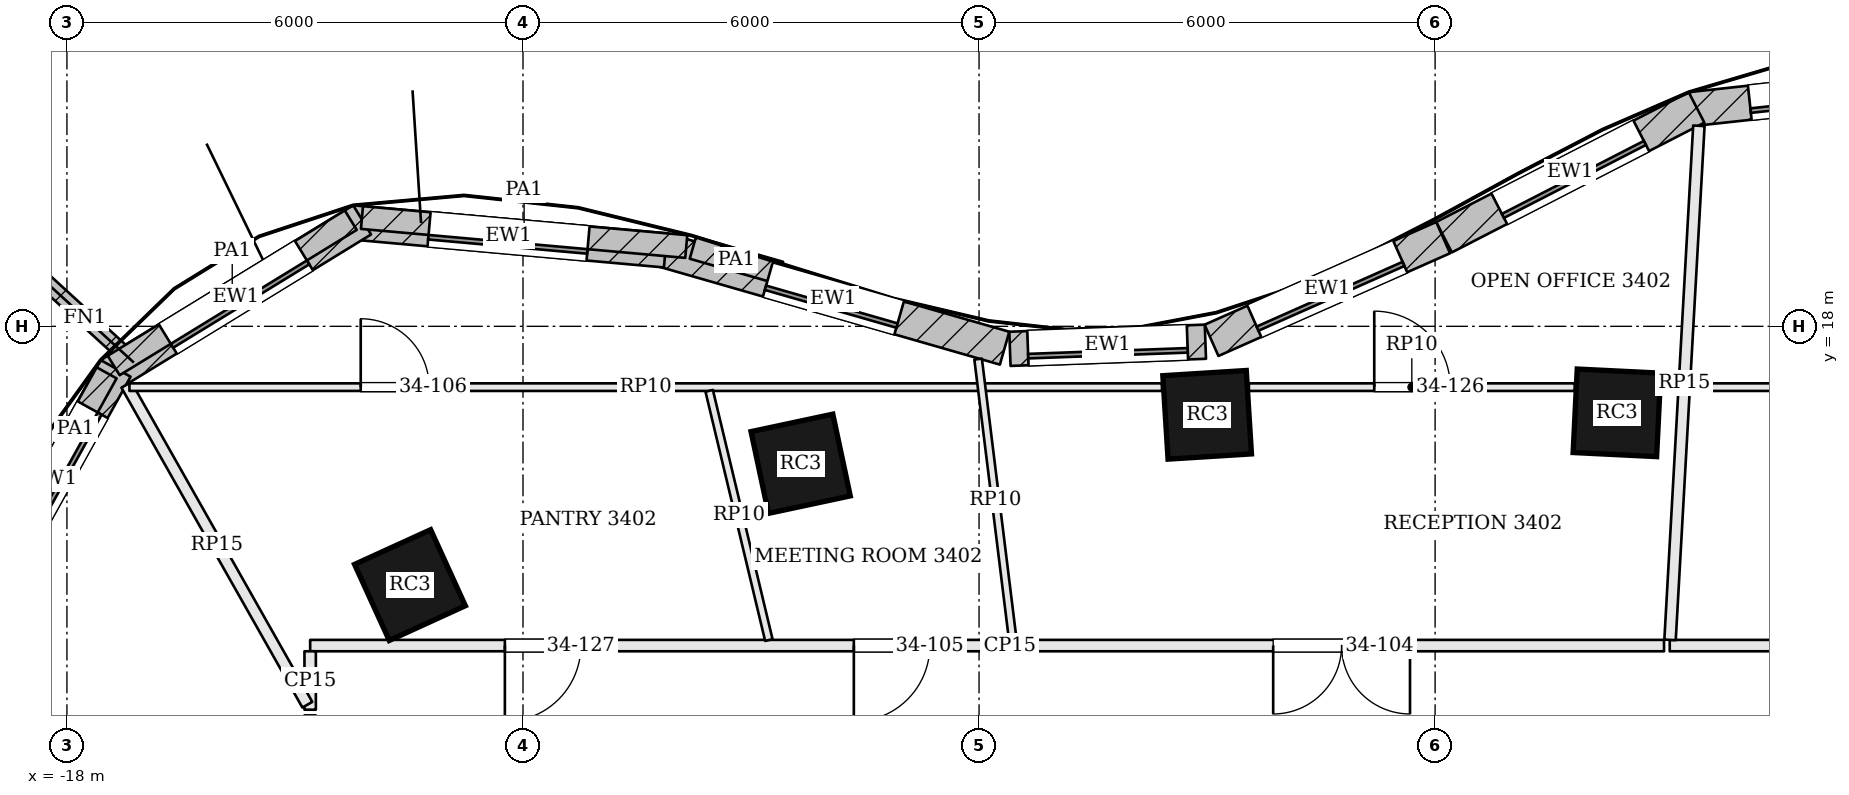
"""IFC4 building model, lengths in metres.
Left out: names, types, materials, properties, quantities, classifications, styles, units other than length and angle.
Written with IfcOpenShell. Run it as: python <this file> out.ifc"""

import sys

from ifc_helpers import new_model, si_unit, direction, frame, frame_2d, origin, origin_2d, place, context, subcontext, project, spatial, rectangle, extrude, element, fill, save


model = new_model("IFC4")
c1 = context("Model", 3, precision=1e-05, world=origin(), true_north=direction((0.0, 1.0)))
c2 = subcontext(c1, "Body", "Model", "MODEL_VIEW")
j1 = project(units=[si_unit("LENGTHUNIT", "METRE"), si_unit("PLANEANGLEUNIT", "RADIAN")], contexts=[c1])
p1 = place(None, origin())
s1 = spatial("IfcSite", under=j1, at=p1, CompositionType="ELEMENT")
p2 = place(p1, origin())
s2 = spatial("IfcBuilding", under=s1, at=p2, CompositionType="ELEMENT")
p3 = place(p2, frame((0.0, 0.0, 142.2)))
s3 = spatial("IfcBuildingStorey", under=s2, at=p3, CompositionType="ELEMENT", Elevation=142.2)
for number, where, z_axis, x_axis in (
    (1, (2.392, 16.862, 0.0), (0.0, 0.0, 1.0), (-0.999, 0.049, 0.0)),
    (2, (-2.999, 16.836, 0.0), (0.0, 0.0, 1.0), (-0.998, -0.062, 0.0)),
    (3, (-8.347, 16.192, 0.0), (0.0, 0.0, 1.0), (-0.978, -0.209, 0.0)),
    (4, (-13.487, 14.596, 0.0), (0.0, 0.0, 1.0), (-0.91, -0.415, 0.0)),
):
    element("IfcColumn", number, at=place(p3, frame(where, z_axis=z_axis, x_axis=x_axis)), inside=s3, PredefinedType="COLUMN", context=c2, shape_type="SweptSolid", body=[
        extrude(rectangle(XDim=1.1, YDim=1.1, at=origin_2d()), origin(), (0.0, 0.0, 1.0), 3.9),
    ])
p4 = place(p3, frame((7.003, 21.255, 0.0), z_axis=(0.0, 0.0, 1.0), x_axis=(-0.99407653264, -0.108682322638, 0.0)))
e5 = element("IfcWall", 5, at=p4, inside=s3, PredefinedType="SOLIDWALL", context=c2, shape_type="SweptSolid", body=[
    extrude(rectangle(XDim=3.662, YDim=0.45, at=frame_2d((1.831, 0.0))), origin(), (0.0, 0.0, 1.0), 3.7),
])
p5 = place(p4, frame((0.781, 0.0, 0.9)))
e6 = element("IfcOpeningElement", 6, at=p5, cuts=e5, PredefinedType="OPENING", context=c2, shape_type="SweptSolid", body=[
    extrude(rectangle(XDim=2.1, YDim=2.3, at=frame_2d((1.05, 1.15))), frame((0.0, 0.235, 0.0), z_axis=(0.0, -1.0, 0.0), x_axis=(1.0, 0.0, 0.0)), (0.0, 0.0, 1.0), 0.47),
])
p6 = place(p3, frame((3.44, 20.88, 0.0), z_axis=(0.0, 0.0, 1.0), x_axis=(-0.889471529144, -0.456990589446, 0.0)))
e7 = element("IfcWall", 7, at=p6, inside=s3, PredefinedType="SOLIDWALL", context=c2, shape_type="SweptSolid", body=[
    extrude(rectangle(XDim=3.735, YDim=0.45, at=frame_2d((1.868, 0.0))), origin(), (0.0, 0.0, 1.0), 3.7),
])
p7 = place(p6, frame((0.818, 0.0, 0.9)))
e8 = element("IfcOpeningElement", 8, at=p7, cuts=e7, PredefinedType="OPENING", context=c2, shape_type="SweptSolid", body=[
    extrude(rectangle(XDim=2.1, YDim=2.3, at=frame_2d((1.05, 1.15))), frame((0.0, 0.235, 0.0), z_axis=(0.0, -1.0, 0.0), x_axis=(1.0, 0.0, 0.0)), (0.0, 0.0, 1.0), 0.47),
])
p8 = place(p3, frame((0.105, 19.167, 0.0), z_axis=(0.0, 0.0, 1.0), x_axis=(-0.91414046241, -0.405397601109, 0.0)))
e9 = element("IfcWall", 9, at=p8, inside=s3, PredefinedType="SOLIDWALL", context=c2, shape_type="SweptSolid", body=[
    extrude(rectangle(XDim=3.333, YDim=0.45, at=frame_2d((1.667, 0.0))), origin(), (0.0, 0.0, 1.0), 3.7),
])
p9 = place(p8, frame((0.617, 0.0, 0.9)))
e10 = element("IfcOpeningElement", 10, at=p9, cuts=e9, PredefinedType="OPENING", context=c2, shape_type="SweptSolid", body=[
    extrude(rectangle(XDim=2.1, YDim=2.3, at=frame_2d((1.05, 1.15))), frame((0.0, 0.235, 0.0), z_axis=(0.0, -1.0, 0.0), x_axis=(1.0, 0.0, 0.0)), (0.0, 0.0, 1.0), 0.47),
])
p10 = place(p3, frame((-3.022, 17.798, 0.0), z_axis=(0.0, 0.0, 1.0), x_axis=(-0.999339560591, -0.036337895349, 0.0)))
e11 = element("IfcWall", 11, at=p10, inside=s3, PredefinedType="SOLIDWALL", context=c2, shape_type="SweptSolid", body=[
    extrude(rectangle(XDim=2.573, YDim=0.45, at=frame_2d((1.287, 0.0))), origin(), (0.0, 0.0, 1.0), 3.7),
])
p11 = place(p10, frame((0.237, 0.0, 0.9)))
e12 = element("IfcOpeningElement", 12, at=p11, cuts=e11, PredefinedType="OPENING", context=c2, shape_type="SweptSolid", body=[
    extrude(rectangle(XDim=2.1, YDim=2.3, at=frame_2d((1.05, 1.15))), frame((0.0, 0.235, 0.0), z_axis=(0.0, -1.0, 0.0), x_axis=(1.0, 0.0, 0.0)), (0.0, 0.0, 1.0), 0.47),
])
p12 = place(p3, frame((-5.664, 17.713, 0.0), z_axis=(0.0, 0.0, 1.0), x_axis=(-0.961108031684, 0.276172684083, 0.0)))
e13 = element("IfcWall", 13, at=p12, inside=s3, PredefinedType="SOLIDWALL", context=c2, shape_type="SweptSolid", body=[
    extrude(rectangle(XDim=4.686, YDim=0.45, at=frame_2d((2.343, 0.0))), origin(), (0.0, 0.0, 1.0), 3.7),
])
p13 = place(p12, frame((1.443, 0.0, 0.9)))
e14 = element("IfcOpeningElement", 14, at=p13, cuts=e13, PredefinedType="OPENING", context=c2, shape_type="SweptSolid", body=[
    extrude(rectangle(XDim=1.8, YDim=2.3, at=frame_2d((0.9, 1.15))), frame((0.0, 0.235, 0.0), z_axis=(0.0, -1.0, 0.0), x_axis=(1.0, 0.0, 0.0)), (0.0, 0.0, 1.0), 0.47),
])
p14 = place(p3, frame((-10.126, 18.999, 0.0), z_axis=(0.0, 0.0, 1.0), x_axis=(-0.996031087117, 0.089006030672, 0.0)))
e15 = element("IfcWall", 15, at=p14, inside=s3, PredefinedType="SOLIDWALL", context=c2, shape_type="SweptSolid", body=[
    extrude(rectangle(XDim=4.145, YDim=0.45, at=frame_2d((2.072, 0.0))), origin(), (0.0, 0.0, 1.0), 3.7),
])
p15 = place(p14, frame((1.022, 0.0, 0.9)))
e16 = element("IfcOpeningElement", 16, at=p15, cuts=e15, PredefinedType="OPENING", context=c2, shape_type="SweptSolid", body=[
    extrude(rectangle(XDim=2.1, YDim=2.3, at=frame_2d((1.05, 1.15))), frame((0.0, 0.235, 0.0), z_axis=(0.0, -1.0, 0.0), x_axis=(1.0, 0.0, 0.0)), (0.0, 0.0, 1.0), 0.47),
])
p16 = place(p3, frame((-14.116, 19.4, 0.0), z_axis=(0.0, 0.0, 1.0), x_axis=(-0.852622865325, -0.522526793117, 0.0)))
e17 = element("IfcWall", 17, at=p16, inside=s3, PredefinedType="SOLIDWALL", context=c2, shape_type="SweptSolid", body=[
    extrude(rectangle(XDim=3.896, YDim=0.45, at=frame_2d((1.948, 0.0))), origin(), (0.0, 0.0, 1.0), 3.7),
])
p17 = place(p16, frame((0.898, 0.0, 0.9)))
e18 = element("IfcOpeningElement", 18, at=p17, cuts=e17, PredefinedType="OPENING", context=c2, shape_type="SweptSolid", body=[
    extrude(rectangle(XDim=2.1, YDim=2.3, at=frame_2d((1.05, 1.15))), frame((0.0, 0.235, 0.0), z_axis=(0.0, -1.0, 0.0), x_axis=(1.0, 0.0, 0.0)), (0.0, 0.0, 1.0), 0.47),
])
p18 = place(p3, frame((-17.359, 17.447, 0.0), z_axis=(0.0, 0.0, 1.0), x_axis=(-0.485618126214, -0.874171056197, 0.0)))
e19 = element("IfcWall", 19, at=p18, inside=s3, PredefinedType="SOLIDWALL", context=c2, shape_type="SweptSolid", body=[
    extrude(rectangle(XDim=3.343, YDim=0.45, at=frame_2d((1.671, 0.0))), origin(), (0.0, 0.0, 1.0), 3.7),
])
p19 = place(p18, frame((0.621, 0.0, 0.9)))
e20 = element("IfcOpeningElement", 20, at=p19, cuts=e19, PredefinedType="OPENING", context=c2, shape_type="SweptSolid", body=[
    extrude(rectangle(XDim=2.1, YDim=2.3, at=frame_2d((1.05, 1.15))), frame((0.0, 0.235, 0.0), z_axis=(0.0, -1.0, 0.0), x_axis=(1.0, 0.0, 0.0)), (0.0, 0.0, 1.0), 0.47),
])
p20 = place(p3, frame((-17.119, 17.523, 0.0), z_axis=(0.0, 0.0, 1.0), x_axis=(-0.737866019047, 0.674947211221, 0.0)))
e21 = element("IfcWall", 21, at=p20, inside=s3, PredefinedType="SOLIDWALL", context=c2, shape_type="SweptSolid", body=[
    extrude(rectangle(XDim=1.75, YDim=0.2, at=frame_2d((0.875, 0.0))), origin(), (0.0, 0.0, 1.0), 3.7),
])
p21 = place(p3, frame((-8.619, 18.704, 3.9), z_axis=(0.0, 0.0, 1.0), x_axis=(-0.961097843869, 0.276208136212, 0.0)))
e22 = element("IfcWall", 22, at=p21, inside=s3, PredefinedType="PARAPET", context=c2, shape_type="SweptSolid", body=[
    extrude(rectangle(XDim=1.192, YDim=0.3, at=frame_2d((0.596, 0.0))), origin(), (0.0, 0.0, 1.0), 1.1),
])
p22 = place(p3, frame((-9.852, 19.05, 3.9), z_axis=(0.0, 0.0, 1.0), x_axis=(-0.996029858658, 0.089019776805, 0.0)))
e23 = element("IfcWall", 23, at=p22, inside=s3, PredefinedType="PARAPET", context=c2, shape_type="SweptSolid", body=[
    extrude(rectangle(XDim=4.284, YDim=0.3, at=frame_2d((2.142, 0.0))), origin(), (0.0, 0.0, 1.0), 1.1),
])
p23 = place(p3, frame((-14.266, 19.396, 3.9), z_axis=(0.0, 0.0, 1.0), x_axis=(-0.852626191256, -0.522521366055, 0.0)))
e24 = element("IfcWall", 24, at=p23, inside=s3, PredefinedType="PARAPET", context=c2, shape_type="SweptSolid", body=[
    extrude(rectangle(XDim=3.658, YDim=0.3, at=frame_2d((1.829, 0.0))), origin(), (0.0, 0.0, 1.0), 1.1),
])
p24 = place(p3, frame((-17.478, 17.388, 3.9), z_axis=(0.0, 0.0, 1.0), x_axis=(-0.485655243725, -0.874150435705, 0.0)))
e25 = element("IfcWall", 25, at=p24, inside=s3, PredefinedType="PARAPET", context=c2, shape_type="SweptSolid", body=[
    extrude(rectangle(XDim=1.684, YDim=0.3, at=frame_2d((0.842, 0.0))), origin(), (0.0, 0.0, 1.0), 1.1),
])
p25 = place(p3, frame((14.725, 13.8, 0.0), z_axis=(0.0, 0.0, 1.0), x_axis=(-1.0, 0.0, 0.0)))
e26 = element("IfcWall", 26, at=p25, inside=s3, PredefinedType="PARTITIONING", context=c2, shape_type="SweptSolid", body=[
    extrude(rectangle(XDim=11.638, YDim=0.15, at=frame_2d((5.819, 0.0))), origin(), (0.0, 0.0, 1.0), 3.198),
])
p26 = place(p25, frame((2.95, 0.0, 0.0)))
e27 = element("IfcOpeningElement", 27, at=p26, cuts=e26, PredefinedType="OPENING", context=c2, shape_type="SweptSolid", body=[
    extrude(rectangle(XDim=1.0, YDim=2.1, at=frame_2d((0.5, 1.05))), frame((0.0, 0.085, 0.0), z_axis=(0.0, -1.0, 0.0), x_axis=(1.0, 0.0, 0.0)), (0.0, 0.0, 1.0), 0.17),
])
p27 = place(p25, frame((8.35, 0.0, 0.0)))
e28 = element("IfcOpeningElement", 28, at=p27, cuts=e26, PredefinedType="OPENING", context=c2, shape_type="SweptSolid", body=[
    extrude(rectangle(XDim=1.0, YDim=2.1, at=frame_2d((0.5, 1.05))), frame((0.0, 0.085, 0.0), z_axis=(0.0, -1.0, 0.0), x_axis=(1.0, 0.0, 0.0)), (0.0, 0.0, 1.0), 0.17),
])
p28 = place(p3, frame((3.47, 20.638, 0.0), z_axis=(0.0, 0.0, 1.0), x_axis=(-0.056008975247, -0.998430265312, 0.0)))
e29 = element("IfcWall", 29, at=p28, inside=s3, PredefinedType="PARTITIONING", context=c2, shape_type="SweptSolid", body=[
    extrude(rectangle(XDim=6.774, YDim=0.15, at=frame_2d((3.387, 0.0))), origin(), (0.0, 0.0, 1.0), 3.198),
])
p29 = place(p3, frame((3.012, 13.8, 0.0), z_axis=(0.0, 0.0, 1.0), x_axis=(-1.0, 0.0, 0.0)))
e30 = element("IfcWall", 30, at=p29, inside=s3, PredefinedType="PARTITIONING", context=c2, shape_type="SweptSolid", body=[
    extrude(rectangle(XDim=17.812, YDim=0.15, at=frame_2d((8.906, 0.0))), origin(), (0.0, 0.0, 1.0), 3.198),
])
p30 = place(p29, frame((3.342, 0.0, 0.0)))
e31 = element("IfcOpeningElement", 31, at=p30, cuts=e30, PredefinedType="OPENING", context=c2, shape_type="SweptSolid", body=[
    extrude(rectangle(XDim=1.8, YDim=2.1, at=frame_2d((0.9, 1.05))), frame((0.0, 0.085, 0.0), z_axis=(0.0, -1.0, 0.0), x_axis=(1.0, 0.0, 0.0)), (0.0, 0.0, 1.0), 0.17),
])
p31 = place(p29, frame((9.659, 0.0, 0.0)))
e32 = element("IfcOpeningElement", 32, at=p31, cuts=e30, PredefinedType="OPENING", context=c2, shape_type="SweptSolid", body=[
    extrude(rectangle(XDim=1.0, YDim=2.4, at=frame_2d((0.5, 1.2))), frame((0.0, 0.085, 0.0), z_axis=(0.0, -1.0, 0.0), x_axis=(1.0, 0.0, 0.0)), (0.0, 0.0, 1.0), 0.17),
])
p32 = place(p29, frame((14.25, 0.0, 0.0)))
e33 = element("IfcOpeningElement", 33, at=p32, cuts=e30, PredefinedType="OPENING", context=c2, shape_type="SweptSolid", body=[
    extrude(rectangle(XDim=1.0, YDim=2.1, at=frame_2d((0.5, 1.05))), frame((0.0, 0.085, 0.0), z_axis=(0.0, -1.0, 0.0), x_axis=(1.0, 0.0, 0.0)), (0.0, 0.0, 1.0), 0.17),
])
p33 = place(p3, frame((-14.8, 13.725, 0.0), z_axis=(0.0, 0.0, 1.0), x_axis=(0.0, -1.0, 0.0)))
e34 = element("IfcWall", 34, at=p33, inside=s3, PredefinedType="PARTITIONING", context=c2, shape_type="SweptSolid", body=[
    extrude(rectangle(XDim=0.769, YDim=0.15, at=frame_2d((0.384, 0.0))), origin(), (0.0, 0.0, 1.0), 3.198),
])
p34 = place(p3, frame((-17.218, 17.23, 0.0), z_axis=(0.0, 0.0, 1.0), x_axis=(0.492436580725, -0.870348329098, 0.0)))
e35 = element("IfcWall", 35, at=p34, inside=s3, PredefinedType="PARTITIONING", context=c2, shape_type="SweptSolid", body=[
    extrude(rectangle(XDim=4.835, YDim=0.15, at=frame_2d((2.417, 0.0))), origin(), (0.0, 0.0, 1.0), 3.198),
])
p35 = place(p3, frame((-14.8, 12.882, 0.0), z_axis=(0.0, 0.0, 1.0), x_axis=(0.0, -1.0, 0.0)))
e36 = element("IfcWall", 36, at=p35, inside=s3, PredefinedType="PARTITIONING", context=c2, shape_type="SweptSolid", body=[
    extrude(rectangle(XDim=16.652, YDim=0.15, at=frame_2d((8.326, 0.0))), origin(), (0.0, 0.0, 1.0), 3.198),
])
p36 = place(p35, frame((2.599, 0.0, 0.0)))
e37 = element("IfcOpeningElement", 37, at=p36, cuts=e36, PredefinedType="OPENING", context=c2, shape_type="SweptSolid", body=[
    extrude(rectangle(XDim=1.8, YDim=2.1, at=frame_2d((0.9, 1.05))), frame((0.0, 0.085, 0.0), z_axis=(0.0, -1.0, 0.0), x_axis=(1.0, 0.0, 0.0)), (0.0, 0.0, 1.0), 0.17),
])
p37 = place(p35, frame((9.456, 0.0, 0.0)))
e38 = element("IfcOpeningElement", 38, at=p37, cuts=e36, PredefinedType="OPENING", context=c2, shape_type="SweptSolid", body=[
    extrude(rectangle(XDim=1.0, YDim=2.4, at=frame_2d((0.5, 1.2))), frame((0.0, 0.085, 0.0), z_axis=(0.0, -1.0, 0.0), x_axis=(1.0, 0.0, 0.0)), (0.0, 0.0, 1.0), 0.17),
])
p38 = place(p35, frame((14.15, 0.0, 0.0)))
e39 = element("IfcOpeningElement", 39, at=p38, cuts=e36, PredefinedType="OPENING", context=c2, shape_type="SweptSolid", body=[
    extrude(rectangle(XDim=1.0, YDim=2.1, at=frame_2d((0.5, 1.05))), frame((0.0, 0.085, 0.0), z_axis=(0.0, -1.0, 0.0), x_axis=(1.0, 0.0, 0.0)), (0.0, 0.0, 1.0), 0.17),
])
p39 = place(p3, frame((3.298, 17.2, 0.0), z_axis=(0.0, 0.0, 1.0), x_axis=(1.0, 0.0, 0.0)))
e40 = element("IfcWall", 40, at=p39, inside=s3, PredefinedType="PARTITIONING", context=c2, shape_type="SweptSolid", body=[
    extrude(rectangle(XDim=8.85, YDim=0.1, at=frame_2d((4.425, 0.0))), origin(), (0.0, 0.0, 1.0), 3.184),
])
p40 = place(p3, frame((-17.178, 17.2, 0.0), z_axis=(0.0, 0.0, 1.0), x_axis=(1.0, 0.0, 0.0)))
e41 = element("IfcWall", 41, at=p40, inside=s3, PredefinedType="PARTITIONING", context=c2, shape_type="SweptSolid", body=[
    extrude(rectangle(XDim=13.585, YDim=0.1, at=frame_2d((6.792, 0.0))), origin(), (0.0, 0.0, 1.0), 3.184),
])
p41 = place(p40, frame((3.043, 0.0, 0.0)))
e42 = element("IfcOpeningElement", 42, at=p41, cuts=e41, PredefinedType="OPENING", context=c2, shape_type="SweptSolid", body=[
    extrude(rectangle(XDim=0.9, YDim=2.1, at=frame_2d((0.45, 1.05))), frame((0.0, 0.06, 0.0), z_axis=(0.0, -1.0, 0.0), x_axis=(1.0, 0.0, 0.0)), (0.0, 0.0, 1.0), 0.12),
])
p42 = place(p3, frame((-2.451, 17.2, 0.0), z_axis=(0.0, 0.0, 1.0), x_axis=(1.0, 0.0, 0.0)))
e43 = element("IfcWall", 43, at=p42, inside=s3, PredefinedType="PARTITIONING", context=c2, shape_type="SweptSolid", body=[
    extrude(rectangle(XDim=4.289, YDim=0.1, at=frame_2d((2.144, 0.0))), origin(), (0.0, 0.0, 1.0), 3.184),
])
p43 = place(p42, frame((1.65, 0.0, 0.0)))
e44 = element("IfcOpeningElement", 44, at=p43, cuts=e43, PredefinedType="OPENING", context=c2, shape_type="SweptSolid", body=[
    extrude(rectangle(XDim=1.0, YDim=2.1, at=frame_2d((0.5, 1.05))), frame((0.0, 0.06, 0.0), z_axis=(0.0, -1.0, 0.0), x_axis=(1.0, 0.0, 0.0)), (0.0, 0.0, 1.0), 0.12),
])
p44 = place(p3, frame((-5.556, 13.875, 0.0), z_axis=(0.0, 0.0, 1.0), x_axis=(-0.122573624649, 0.99245942312, 0.0)))
e45 = element("IfcWall", 45, at=p44, inside=s3, PredefinedType="PARTITIONING", context=c2, shape_type="SweptSolid", body=[
    extrude(rectangle(XDim=3.723, YDim=0.1, at=frame_2d((1.861, 0.0))), origin(), (0.0, 0.0, 1.0), 3.184),
])
p45 = place(p3, frame((-8.765, 13.873, 0.0), z_axis=(0.0, 0.0, 1.0), x_axis=(-0.232827854215, 0.972517963999, 0.0)))
e46 = element("IfcWall", 46, at=p45, inside=s3, PredefinedType="PARTITIONING", context=c2, shape_type="SweptSolid", body=[
    extrude(rectangle(XDim=3.371, YDim=0.1, at=frame_2d((1.686, 0.0))), origin(), (0.0, 0.0, 1.0), 3.184),
])
p46 = place(p5, origin())
e47 = element("IfcWindow", 47, at=p46, inside=s3, PartitioningType="SINGLE_PANEL", PredefinedType="WINDOW", context=c2, shape_type="SweptSolid", body=[
    extrude(rectangle(XDim=2.1, YDim=2.3, at=frame_2d((1.05, 1.15))), frame((0.0, 0.135, 0.0), z_axis=(0.0, -1.0, 0.0), x_axis=(1.0, 0.0, 0.0)), (0.0, 0.0, 1.0), 0.06),
])
fill(e6, e47)
p47 = place(p7, origin())
e48 = element("IfcWindow", 48, at=p47, inside=s3, PartitioningType="SINGLE_PANEL", PredefinedType="WINDOW", context=c2, shape_type="SweptSolid", body=[
    extrude(rectangle(XDim=2.1, YDim=2.3, at=frame_2d((1.05, 1.15))), frame((0.0, 0.135, 0.0), z_axis=(0.0, -1.0, 0.0), x_axis=(1.0, 0.0, 0.0)), (0.0, 0.0, 1.0), 0.06),
])
fill(e8, e48)
p48 = place(p9, origin())
e49 = element("IfcWindow", 49, at=p48, inside=s3, PartitioningType="SINGLE_PANEL", PredefinedType="WINDOW", context=c2, shape_type="SweptSolid", body=[
    extrude(rectangle(XDim=2.1, YDim=2.3, at=frame_2d((1.05, 1.15))), frame((0.0, 0.135, 0.0), z_axis=(0.0, -1.0, 0.0), x_axis=(1.0, 0.0, 0.0)), (0.0, 0.0, 1.0), 0.06),
])
fill(e10, e49)
p49 = place(p11, origin())
e50 = element("IfcWindow", 50, at=p49, inside=s3, PartitioningType="SINGLE_PANEL", PredefinedType="WINDOW", context=c2, shape_type="SweptSolid", body=[
    extrude(rectangle(XDim=2.1, YDim=2.3, at=frame_2d((1.05, 1.15))), frame((0.0, 0.135, 0.0), z_axis=(0.0, -1.0, 0.0), x_axis=(1.0, 0.0, 0.0)), (0.0, 0.0, 1.0), 0.06),
])
fill(e12, e50)
p50 = place(p13, origin())
e51 = element("IfcWindow", 51, at=p50, inside=s3, PartitioningType="SINGLE_PANEL", PredefinedType="WINDOW", context=c2, shape_type="SweptSolid", body=[
    extrude(rectangle(XDim=1.8, YDim=2.3, at=frame_2d((0.9, 1.15))), frame((0.0, 0.135, 0.0), z_axis=(0.0, -1.0, 0.0), x_axis=(1.0, 0.0, 0.0)), (0.0, 0.0, 1.0), 0.06),
])
fill(e14, e51)
p51 = place(p15, origin())
e52 = element("IfcWindow", 52, at=p51, inside=s3, PartitioningType="SINGLE_PANEL", PredefinedType="WINDOW", context=c2, shape_type="SweptSolid", body=[
    extrude(rectangle(XDim=2.1, YDim=2.3, at=frame_2d((1.05, 1.15))), frame((0.0, 0.135, 0.0), z_axis=(0.0, -1.0, 0.0), x_axis=(1.0, 0.0, 0.0)), (0.0, 0.0, 1.0), 0.06),
])
fill(e16, e52)
p52 = place(p17, origin())
e53 = element("IfcWindow", 53, at=p52, inside=s3, PartitioningType="SINGLE_PANEL", PredefinedType="WINDOW", context=c2, shape_type="SweptSolid", body=[
    extrude(rectangle(XDim=2.1, YDim=2.3, at=frame_2d((1.05, 1.15))), frame((0.0, 0.135, 0.0), z_axis=(0.0, -1.0, 0.0), x_axis=(1.0, 0.0, 0.0)), (0.0, 0.0, 1.0), 0.06),
])
fill(e18, e53)
p53 = place(p19, origin())
e54 = element("IfcWindow", 54, at=p53, inside=s3, PartitioningType="SINGLE_PANEL", PredefinedType="WINDOW", context=c2, shape_type="SweptSolid", body=[
    extrude(rectangle(XDim=2.1, YDim=2.3, at=frame_2d((1.05, 1.15))), frame((0.0, 0.135, 0.0), z_axis=(0.0, -1.0, 0.0), x_axis=(1.0, 0.0, 0.0)), (0.0, 0.0, 1.0), 0.06),
])
fill(e20, e54)
p54 = place(p30, origin())
e55 = element("IfcDoor", 55, at=p54, inside=s3, OperationType="DOUBLE_DOOR_SINGLE_SWING", PredefinedType="DOOR", context=c2, shape_type="SweptSolid", body=[
    extrude(rectangle(XDim=1.8, YDim=2.1, at=frame_2d((0.9, 1.05))), frame((0.0, 0.025, 0.0), z_axis=(0.0, -1.0, 0.0), x_axis=(1.0, 0.0, 0.0)), (0.0, 0.0, 1.0), 0.05),
])
fill(e31, e55)
p55 = place(p31, origin())
e56 = element("IfcDoor", 56, at=p55, inside=s3, OperationType="SINGLE_SWING_RIGHT", PredefinedType="DOOR", context=c2, shape_type="SweptSolid", body=[
    extrude(rectangle(XDim=1.0, YDim=2.4, at=frame_2d((0.5, 1.2))), frame((0.0, 0.025, 0.0), z_axis=(0.0, -1.0, 0.0), x_axis=(1.0, 0.0, 0.0)), (0.0, 0.0, 1.0), 0.05),
])
fill(e32, e56)
p56 = place(p41, origin())
e57 = element("IfcDoor", 57, at=p56, inside=s3, OperationType="SINGLE_SWING_LEFT", PredefinedType="DOOR", context=c2, shape_type="SweptSolid", body=[
    extrude(rectangle(XDim=0.9, YDim=2.1, at=frame_2d((0.45, 1.05))), frame((0.0, 0.025, 0.0), z_axis=(0.0, -1.0, 0.0), x_axis=(1.0, 0.0, 0.0)), (0.0, 0.0, 1.0), 0.05),
])
fill(e42, e57)
p57 = place(p43, origin())
e58 = element("IfcDoor", 58, at=p57, inside=s3, OperationType="SINGLE_SWING_LEFT", PredefinedType="DOOR", context=c2, shape_type="SweptSolid", body=[
    extrude(rectangle(XDim=1.0, YDim=2.1, at=frame_2d((0.5, 1.05))), frame((0.0, 0.025, 0.0), z_axis=(0.0, -1.0, 0.0), x_axis=(1.0, 0.0, 0.0)), (0.0, 0.0, 1.0), 0.05),
])
fill(e44, e58)
p58 = place(p32, origin())
e59 = element("IfcDoor", 59, at=p58, inside=s3, OperationType="SINGLE_SWING_RIGHT", PredefinedType="DOOR", context=c2, shape_type="SweptSolid", body=[
    extrude(rectangle(XDim=1.0, YDim=2.1, at=frame_2d((0.5, 1.05))), frame((0.0, 0.025, 0.0), z_axis=(0.0, -1.0, 0.0), x_axis=(1.0, 0.0, 0.0)), (0.0, 0.0, 1.0), 0.05),
])
fill(e33, e59)
save(model, sys.argv[1])
